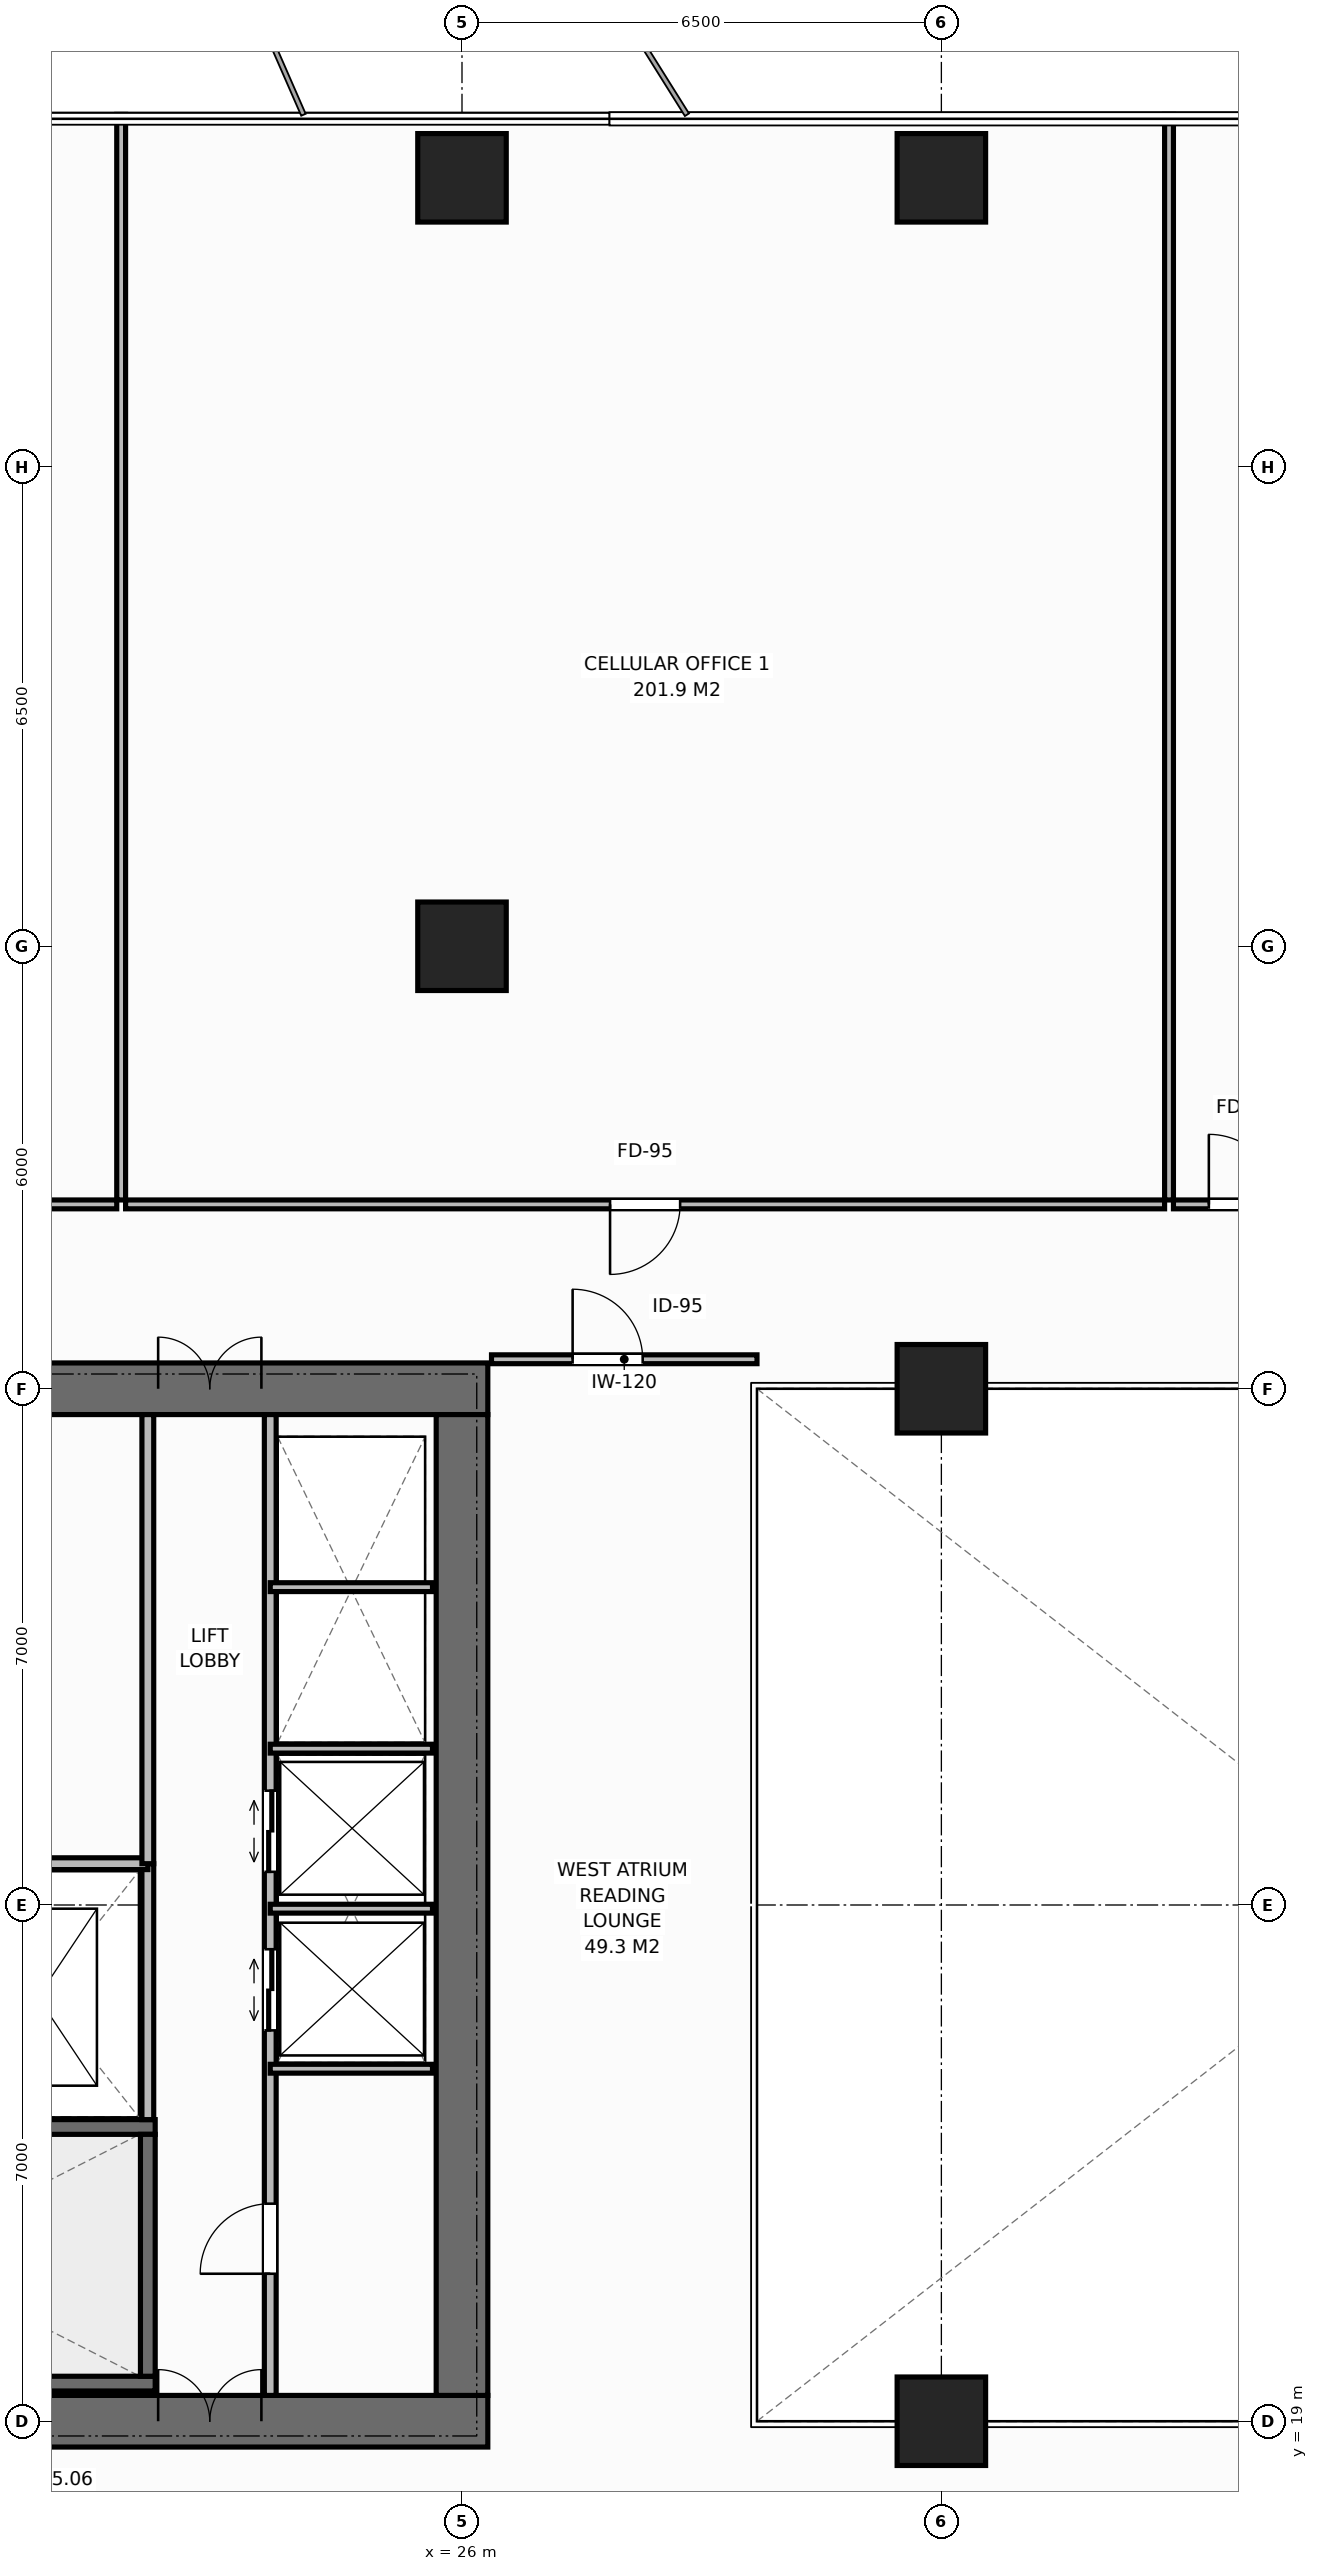
"""IFC4 building model, lengths in metres.
Left out: names, types, materials, properties, quantities, classifications, styles, units other than length and angle.
Written with IfcOpenShell. Run it as: python <this file> out.ifc"""

import sys

from ifc_helpers import new_model, si_unit, direction, frame, frame_2d, origin, origin_2d, place, context, subcontext, project, spatial, rectangle, extrude, element, fill, save


model = new_model("IFC4")
c1 = context("Model", 3, precision=1e-05, world=origin(), true_north=direction((0.0, 1.0)))
c2 = subcontext(c1, "Body", "Model", "MODEL_VIEW")
j1 = project(units=[si_unit("LENGTHUNIT", "METRE"), si_unit("PLANEANGLEUNIT", "RADIAN")], contexts=[c1])
p1 = place(None, origin())
s1 = spatial("IfcSite", under=j1, at=p1, CompositionType="ELEMENT")
p2 = place(p1, origin())
s2 = spatial("IfcBuilding", under=s1, at=p2, CompositionType="ELEMENT")
p3 = place(p2, frame((0.0, 0.0, 101.2)))
s3 = spatial("IfcBuildingStorey", under=s2, at=p3, CompositionType="ELEMENT", Elevation=101.2)
p4 = place(p3, frame((12.65, 19.0, 0.0), z_axis=(0.0, 0.0, 1.0), x_axis=(1.0, 0.0, 0.0)))
e1 = element("IfcWall", 1, at=p4, inside=s3, PredefinedType="SHEAR", context=c2, shape_type="SweptSolid", body=[
    extrude(rectangle(XDim=13.7, YDim=0.7, at=frame_2d((6.85, 0.0))), origin(), (0.0, 0.0, 1.0), 3.8),
])
p5 = place(p4, frame((9.23, 0.0, 0.0)))
e2 = element("IfcOpeningElement", 2, at=p5, cuts=e1, PredefinedType="OPENING", context=c2, shape_type="SweptSolid", body=[
    extrude(rectangle(XDim=1.4, YDim=2.2, at=frame_2d((0.7, 1.1))), frame((0.0, 0.36, 0.0), z_axis=(0.0, -1.0, 0.0), x_axis=(1.0, 0.0, 0.0)), (0.0, 0.0, 1.0), 0.72),
])
p6 = place(p3, frame((12.65, 33.0, 0.0), z_axis=(0.0, 0.0, 1.0), x_axis=(1.0, 0.0, 0.0)))
e3 = element("IfcWall", 3, at=p6, inside=s3, PredefinedType="SHEAR", context=c2, shape_type="SweptSolid", body=[
    extrude(rectangle(XDim=13.7, YDim=0.7, at=frame_2d((6.85, 0.0))), origin(), (0.0, 0.0, 1.0), 3.8),
])
p7 = place(p6, frame((1.25, 0.0, 0.0)))
e4 = element("IfcOpeningElement", 4, at=p7, cuts=e3, PredefinedType="OPENING", context=c2, shape_type="SweptSolid", body=[
    extrude(rectangle(XDim=0.9, YDim=2.15, at=frame_2d((0.45, 1.075))), frame((0.0, 0.36, 0.0), z_axis=(0.0, -1.0, 0.0), x_axis=(1.0, 0.0, 0.0)), (0.0, 0.0, 1.0), 0.72),
])
p8 = place(p6, frame((3.3, 0.0, 0.0)))
e5 = element("IfcOpeningElement", 5, at=p8, cuts=e3, PredefinedType="OPENING", context=c2, shape_type="SweptSolid", body=[
    extrude(rectangle(XDim=0.95, YDim=2.15, at=frame_2d((0.475, 1.075))), frame((0.0, 0.36, 0.0), z_axis=(0.0, -1.0, 0.0), x_axis=(1.0, 0.0, 0.0)), (0.0, 0.0, 1.0), 0.72),
])
p9 = place(p6, frame((6.15, 0.0, 0.0)))
e6 = element("IfcOpeningElement", 6, at=p9, cuts=e3, PredefinedType="OPENING", context=c2, shape_type="SweptSolid", body=[
    extrude(rectangle(XDim=0.95, YDim=2.15, at=frame_2d((0.475, 1.075))), frame((0.0, 0.36, 0.0), z_axis=(0.0, -1.0, 0.0), x_axis=(1.0, 0.0, 0.0)), (0.0, 0.0, 1.0), 0.72),
])
p10 = place(p6, frame((9.23, 0.0, 0.0)))
e7 = element("IfcOpeningElement", 7, at=p10, cuts=e3, PredefinedType="OPENING", context=c2, shape_type="SweptSolid", body=[
    extrude(rectangle(XDim=1.4, YDim=2.2, at=frame_2d((0.7, 1.1))), frame((0.0, 0.36, 0.0), z_axis=(0.0, -1.0, 0.0), x_axis=(1.0, 0.0, 0.0)), (0.0, 0.0, 1.0), 0.72),
])
p11 = place(p3, frame((26.0, 19.35, 0.0), z_axis=(0.0, 0.0, 1.0), x_axis=(0.0, 1.0, 0.0)))
e8 = element("IfcWall", 8, at=p11, inside=s3, PredefinedType="SHEAR", context=c2, shape_type="SweptSolid", body=[
    extrude(rectangle(XDim=13.3, YDim=0.7, at=frame_2d((6.65, 0.0))), origin(), (0.0, 0.0, 1.0), 3.8),
])
p12 = place(p3, frame((13.41, 19.51, 0.0), z_axis=(0.0, 0.0, 1.0), x_axis=(1.0, 0.0, 0.0)))
e9 = element("IfcWall", 9, at=p12, inside=s3, PredefinedType="SHEAR", context=c2, shape_type="SweptSolid", body=[
    extrude(rectangle(XDim=8.43, YDim=0.2, at=frame_2d((4.215, 0.0))), origin(), (0.0, 0.0, 1.0), 3.8),
])
p13 = place(p3, frame((13.41, 22.99, 0.0), z_axis=(0.0, 0.0, 1.0), x_axis=(1.0, 0.0, 0.0)))
e10 = element("IfcWall", 10, at=p13, inside=s3, PredefinedType="SHEAR", context=c2, shape_type="SweptSolid", body=[
    extrude(rectangle(XDim=8.43, YDim=0.2, at=frame_2d((4.215, 0.0))), origin(), (0.0, 0.0, 1.0), 3.8),
])
p14 = place(p13, frame((0.45, 0.0, 0.0)))
e11 = element("IfcOpeningElement", 11, at=p14, cuts=e10, PredefinedType="OPENING", context=c2, shape_type="SweptSolid", body=[
    extrude(rectangle(XDim=1.0, YDim=2.15, at=frame_2d((0.5, 1.075))), frame((0.0, 0.11, 0.0), z_axis=(0.0, -1.0, 0.0), x_axis=(1.0, 0.0, 0.0)), (0.0, 0.0, 1.0), 0.22),
])
p15 = place(p3, frame((21.74, 19.61, 0.0), z_axis=(0.0, 0.0, 1.0), x_axis=(0.0, 1.0, 0.0)))
e12 = element("IfcWall", 12, at=p15, inside=s3, PredefinedType="SHEAR", context=c2, shape_type="SweptSolid", body=[
    extrude(rectangle(XDim=3.28, YDim=0.2, at=frame_2d((1.64, 0.0))), origin(), (0.0, 0.0, 1.0), 3.8),
])
for number, where, z_axis, x_axis in (
    (13, (32.5, 19.0, 0.0), (0.0, 0.0, 1.0), (1.0, 0.0, 0.0)),
    (14, (32.5, 33.0, 0.0), (0.0, 0.0, 1.0), (1.0, 0.0, 0.0)),
    (15, (26.0, 39.0, 0.0), (0.0, 0.0, 1.0), (1.0, 0.0, 0.0)),
    (16, (26.0, 49.42, 0.0), (0.0, 0.0, 1.0), (1.0, 0.0, 0.0)),
    (17, (32.5, 49.42, 0.0), (0.0, 0.0, 1.0), (1.0, 0.0, 0.0)),
):
    element("IfcColumn", number, at=place(p3, frame(where, z_axis=z_axis, x_axis=x_axis)), inside=s3, PredefinedType="COLUMN", context=c2, shape_type="SweptSolid", body=[
        extrude(rectangle(XDim=1.2, YDim=1.2, at=origin_2d()), origin(), (0.0, 0.0, 1.0), 3.8),
    ])
p16 = place(p3, frame((21.74, 23.09, 0.0), z_axis=(0.0, 0.0, 1.0), x_axis=(0.0, 1.0, 0.0)))
e18 = element("IfcWall", 18, at=p16, inside=s3, PredefinedType="STANDARD", context=c2, shape_type="SweptSolid", body=[
    extrude(rectangle(XDim=3.47, YDim=0.16, at=frame_2d((1.735, 0.0))), origin(), (0.0, 0.0, 1.0), 3.565),
])
p17 = place(p3, frame((13.4, 26.56, 0.0), z_axis=(0.0, 0.0, 1.0), x_axis=(1.0, 0.0, 0.0)))
e19 = element("IfcWall", 19, at=p17, inside=s3, PredefinedType="STANDARD", context=c2, shape_type="SweptSolid", body=[
    extrude(rectangle(XDim=8.34, YDim=0.16, at=frame_2d((4.17, 0.0))), origin(), (0.0, 0.0, 1.0), 3.565),
])
p18 = place(p3, frame((21.74, 26.56, 0.0), z_axis=(0.0, 0.0, 1.0), x_axis=(0.0, 1.0, 0.0)))
e20 = element("IfcWall", 20, at=p18, inside=s3, PredefinedType="STANDARD", context=c2, shape_type="SweptSolid", body=[
    extrude(rectangle(XDim=6.09, YDim=0.16, at=frame_2d((3.045, 0.0))), origin(), (0.0, 0.0, 1.0), 3.565),
])
p19 = place(p3, frame((23.4, 19.35, 0.0), z_axis=(0.0, 0.0, 1.0), x_axis=(0.0, 1.0, 0.0)))
e21 = element("IfcWall", 21, at=p19, inside=s3, PredefinedType="STANDARD", context=c2, shape_type="SweptSolid", body=[
    extrude(rectangle(XDim=13.3, YDim=0.16, at=frame_2d((6.65, 0.0))), origin(), (0.0, 0.0, 1.0), 3.565),
])
p20 = place(p19, frame((1.65, 0.0, 0.0)))
e22 = element("IfcOpeningElement", 22, at=p20, cuts=e21, PredefinedType="OPENING", context=c2, shape_type="SweptSolid", body=[
    extrude(rectangle(XDim=0.95, YDim=2.15, at=frame_2d((0.475, 1.075))), frame((0.0, 0.09, 0.0), z_axis=(0.0, -1.0, 0.0), x_axis=(1.0, 0.0, 0.0)), (0.0, 0.0, 1.0), 0.18),
])
p21 = place(p19, frame((4.95, 0.0, 0.0)))
e23 = element("IfcOpeningElement", 23, at=p21, cuts=e21, PredefinedType="OPENING", context=c2, shape_type="SweptSolid", body=[
    extrude(rectangle(XDim=1.1, YDim=2.2, at=frame_2d((0.55, 1.1))), frame((0.0, 0.09, 0.0), z_axis=(0.0, -1.0, 0.0), x_axis=(1.0, 0.0, 0.0)), (0.0, 0.0, 1.0), 0.18),
])
p22 = place(p19, frame((7.1, 0.0, 0.0)))
e24 = element("IfcOpeningElement", 24, at=p22, cuts=e21, PredefinedType="OPENING", context=c2, shape_type="SweptSolid", body=[
    extrude(rectangle(XDim=1.1, YDim=2.2, at=frame_2d((0.55, 1.1))), frame((0.0, 0.09, 0.0), z_axis=(0.0, -1.0, 0.0), x_axis=(1.0, 0.0, 0.0)), (0.0, 0.0, 1.0), 0.18),
])
for number, where, z_axis, x_axis in (
    (25, (23.4, 23.78, 0.0), (0.0, 0.0, 1.0), (1.0, 0.0, 0.0)),
    (26, (23.4, 25.95, 0.0), (0.0, 0.0, 1.0), (1.0, 0.0, 0.0)),
    (27, (23.4, 28.12, 0.0), (0.0, 0.0, 1.0), (1.0, 0.0, 0.0)),
    (28, (23.4, 30.31, 0.0), (0.0, 0.0, 1.0), (1.0, 0.0, 0.0)),
):
    element("IfcWall", number, at=place(p3, frame(where, z_axis=z_axis, x_axis=x_axis)), inside=s3, PredefinedType="PARTITIONING", context=c2, shape_type="SweptSolid", body=[
        extrude(rectangle(XDim=2.2, YDim=0.12, at=frame_2d((1.1, 0.0))), origin(), (0.0, 0.0, 1.0), 3.565),
    ])
p23 = place(p3, frame((26.4, 33.4, 0.0), z_axis=(0.0, 0.0, 1.0), x_axis=(1.0, 0.0, 0.0)))
e29 = element("IfcWall", 29, at=p23, inside=s3, PredefinedType="PARTITIONING", context=c2, shape_type="SweptSolid", body=[
    extrude(rectangle(XDim=3.6, YDim=0.12, at=frame_2d((1.8, 0.0))), origin(), (0.0, 0.0, 1.0), 3.565),
])
p24 = place(p23, frame((1.1, 0.0, 0.0)))
e30 = element("IfcOpeningElement", 30, at=p24, cuts=e29, PredefinedType="OPENING", context=c2, shape_type="SweptSolid", body=[
    extrude(rectangle(XDim=0.95, YDim=2.15, at=frame_2d((0.475, 1.075))), frame((0.0, 0.07, 0.0), z_axis=(0.0, -1.0, 0.0), x_axis=(1.0, 0.0, 0.0)), (0.0, 0.0, 1.0), 0.14),
])
p25 = place(p3, frame((21.378, 35.56, 0.0), z_axis=(0.0, 0.0, 1.0), x_axis=(0.0, 1.0, 0.0)))
e31 = element("IfcWall", 31, at=p25, inside=s3, PredefinedType="PARTITIONING", context=c2, shape_type="SweptSolid", body=[
    extrude(rectangle(XDim=14.72, YDim=0.12, at=frame_2d((7.36, 0.0))), origin(), (0.0, 0.0, 1.0), 3.565),
])
p26 = place(p3, frame((1.98, 35.5, 0.0), z_axis=(0.0, 0.0, 1.0), x_axis=(1.0, 0.0, 0.0)))
e32 = element("IfcWall", 32, at=p26, inside=s3, PredefinedType="PARTITIONING", context=c2, shape_type="SweptSolid", body=[
    extrude(rectangle(XDim=19.339, YDim=0.12, at=frame_2d((9.669, 0.0))), origin(), (0.0, 0.0, 1.0), 3.565),
])
p27 = place(p26, frame((13.404, 0.0, 0.0)))
e33 = element("IfcOpeningElement", 33, at=p27, cuts=e32, PredefinedType="OPENING", context=c2, shape_type="SweptSolid", body=[
    extrude(rectangle(XDim=0.95, YDim=2.15, at=frame_2d((0.475, 1.075))), frame((0.0, 0.07, 0.0), z_axis=(0.0, -1.0, 0.0), x_axis=(1.0, 0.0, 0.0)), (0.0, 0.0, 1.0), 0.14),
])
p28 = place(p3, frame((35.587, 35.56, 0.0), z_axis=(0.0, 0.0, 1.0), x_axis=(0.0, 1.0, 0.0)))
e34 = element("IfcWall", 34, at=p28, inside=s3, PredefinedType="PARTITIONING", context=c2, shape_type="SweptSolid", body=[
    extrude(rectangle(XDim=14.72, YDim=0.12, at=frame_2d((7.36, 0.0))), origin(), (0.0, 0.0, 1.0), 3.565),
])
p29 = place(p3, frame((21.438, 35.5, 0.0), z_axis=(0.0, 0.0, 1.0), x_axis=(1.0, 0.0, 0.0)))
e35 = element("IfcWall", 35, at=p29, inside=s3, PredefinedType="PARTITIONING", context=c2, shape_type="SweptSolid", body=[
    extrude(rectangle(XDim=14.088, YDim=0.12, at=frame_2d((7.044, 0.0))), origin(), (0.0, 0.0, 1.0), 3.565),
])
p30 = place(p29, frame((6.569, 0.0, 0.0)))
e36 = element("IfcOpeningElement", 36, at=p30, cuts=e35, PredefinedType="OPENING", context=c2, shape_type="SweptSolid", body=[
    extrude(rectangle(XDim=0.95, YDim=2.15, at=frame_2d((0.475, 1.075))), frame((0.0, 0.07, 0.0), z_axis=(0.0, -1.0, 0.0), x_axis=(1.0, 0.0, 0.0)), (0.0, 0.0, 1.0), 0.14),
])
p31 = place(p3, frame((35.647, 35.5, 0.0), z_axis=(0.0, 0.0, 1.0), x_axis=(1.0, 0.0, 0.0)))
e37 = element("IfcWall", 37, at=p31, inside=s3, PredefinedType="PARTITIONING", context=c2, shape_type="SweptSolid", body=[
    extrude(rectangle(XDim=21.87, YDim=0.12, at=frame_2d((10.935, 0.0))), origin(), (0.0, 0.0, 1.0), 3.565),
])
p32 = place(p31, frame((0.48, 0.0, 0.0)))
e38 = element("IfcOpeningElement", 38, at=p32, cuts=e37, PredefinedType="OPENING", context=c2, shape_type="SweptSolid", body=[
    extrude(rectangle(XDim=0.95, YDim=2.15, at=frame_2d((0.475, 1.075))), frame((0.0, 0.07, 0.0), z_axis=(0.0, -1.0, 0.0), x_axis=(1.0, 0.0, 0.0)), (0.0, 0.0, 1.0), 0.14),
])
p33 = place(p5, origin())
e39 = element("IfcDoor", 39, at=p33, inside=s3, OperationType="DOUBLE_DOOR_SINGLE_SWING", PredefinedType="DOOR", context=c2, shape_type="SweptSolid", body=[
    extrude(rectangle(XDim=1.4, YDim=2.2, at=frame_2d((0.7, 1.1))), frame((0.0, 0.125, 0.0), z_axis=(0.0, -1.0, 0.0), x_axis=(1.0, 0.0, 0.0)), (0.0, 0.0, 1.0), 0.05),
])
fill(e2, e39)
p34 = place(p10, origin())
e40 = element("IfcDoor", 40, at=p34, inside=s3, OperationType="DOUBLE_DOOR_SINGLE_SWING", PredefinedType="DOOR", context=c2, shape_type="SweptSolid", body=[
    extrude(rectangle(XDim=1.4, YDim=2.2, at=frame_2d((0.7, 1.1))), frame((0.0, -0.075, 0.0), z_axis=(0.0, -1.0, 0.0), x_axis=(1.0, 0.0, 0.0)), (0.0, 0.0, 1.0), 0.05),
])
fill(e7, e40)
p35 = place(p20, origin())
e41 = element("IfcDoor", 41, at=p35, inside=s3, OperationType="SINGLE_SWING_LEFT", PredefinedType="DOOR", context=c2, shape_type="SweptSolid", body=[
    extrude(rectangle(XDim=0.95, YDim=2.15, at=frame_2d((0.475, 1.075))), frame((0.0, 0.025, 0.0), z_axis=(0.0, -1.0, 0.0), x_axis=(1.0, 0.0, 0.0)), (0.0, 0.0, 1.0), 0.05),
])
fill(e22, e41)
p36 = place(p21, origin())
e42 = element("IfcDoor", 42, at=p36, inside=s3, OperationType="DOUBLE_DOOR_SLIDING", PredefinedType="DOOR", context=c2, shape_type="SweptSolid", body=[
    extrude(rectangle(XDim=1.1, YDim=2.2, at=frame_2d((0.55, 1.1))), frame((0.0, 0.025, 0.0), z_axis=(0.0, -1.0, 0.0), x_axis=(1.0, 0.0, 0.0)), (0.0, 0.0, 1.0), 0.05),
])
fill(e23, e42)
p37 = place(p22, origin())
e43 = element("IfcDoor", 43, at=p37, inside=s3, OperationType="DOUBLE_DOOR_SLIDING", PredefinedType="DOOR", context=c2, shape_type="SweptSolid", body=[
    extrude(rectangle(XDim=1.1, YDim=2.2, at=frame_2d((0.55, 1.1))), frame((0.0, 0.025, 0.0), z_axis=(0.0, -1.0, 0.0), x_axis=(1.0, 0.0, 0.0)), (0.0, 0.0, 1.0), 0.05),
])
fill(e24, e43)
p38 = place(p24, origin())
e44 = element("IfcDoor", 44, at=p38, inside=s3, OperationType="SINGLE_SWING_LEFT", PredefinedType="DOOR", context=c2, shape_type="SweptSolid", body=[
    extrude(rectangle(XDim=0.95, YDim=2.15, at=frame_2d((0.475, 1.075))), frame((0.0, 0.025, 0.0), z_axis=(0.0, -1.0, 0.0), x_axis=(1.0, 0.0, 0.0)), (0.0, 0.0, 1.0), 0.05),
])
fill(e30, e44)
p39 = place(p30, origin())
e45 = element("IfcDoor", 45, at=p39, inside=s3, OperationType="SINGLE_SWING_RIGHT", PredefinedType="DOOR", context=c2, shape_type="SweptSolid", body=[
    extrude(rectangle(XDim=0.95, YDim=2.15, at=frame_2d((0.475, 1.075))), frame((0.0, 0.025, 0.0), z_axis=(0.0, -1.0, 0.0), x_axis=(1.0, 0.0, 0.0)), (0.0, 0.0, 1.0), 0.05),
])
fill(e36, e45)
p40 = place(p32, origin())
e46 = element("IfcDoor", 46, at=p40, inside=s3, OperationType="SINGLE_SWING_LEFT", PredefinedType="DOOR", context=c2, shape_type="SweptSolid", body=[
    extrude(rectangle(XDim=0.95, YDim=2.15, at=frame_2d((0.475, 1.075))), frame((0.0, 0.025, 0.0), z_axis=(0.0, -1.0, 0.0), x_axis=(1.0, 0.0, 0.0)), (0.0, 0.0, 1.0), 0.05),
])
fill(e38, e46)
save(model, sys.argv[1])
